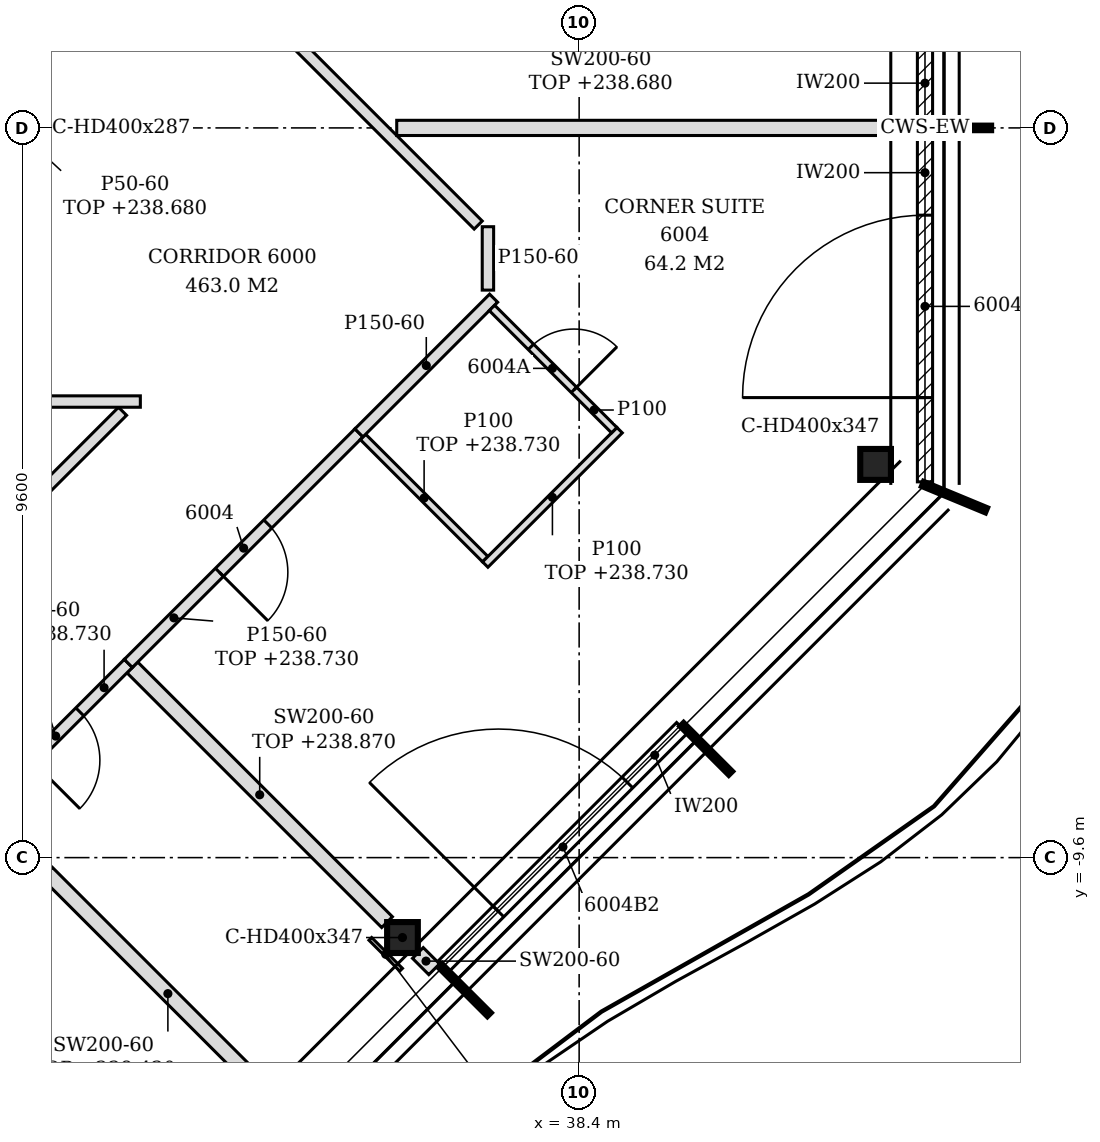
"""IFC4 building model, lengths in metres.
Left out: names, types, materials, properties, quantities, classifications, styles, units other than length and angle.
Written with IfcOpenShell. Run it as: python <this file> out.ifc"""

import sys

from ifc_helpers import new_model, si_unit, direction, frame, frame_2d, origin, origin_2d, place, context, subcontext, project, spatial, polyline, rectangle, i_section, outline, extrude, element, fill, save


model = new_model("IFC4")
c1 = context("Model", 3, precision=1e-05, world=origin(), true_north=direction((0.0, 1.0)))
c2 = subcontext(c1, "Body", "Model", "MODEL_VIEW")
j1 = project(units=[si_unit("LENGTHUNIT", "METRE"), si_unit("PLANEANGLEUNIT", "RADIAN")], contexts=[c1])
p1 = place(None, origin())
s1 = spatial("IfcSite", under=j1, at=p1, CompositionType="ELEMENT")
p2 = place(p1, origin())
s2 = spatial("IfcBuilding", under=s1, at=p2, CompositionType="ELEMENT")
p3 = place(p2, frame((0.0, 0.0, 235.8)))
s3 = spatial("IfcBuildingStorey", under=s2, at=p3, CompositionType="ELEMENT", Elevation=235.8)
for number, where, z_axis, x_axis in (
    (1, (36.076, -10.652, -0.15), (0.0, 0.0, 1.0), (1.0, 0.0, 0.0)),
    (2, (42.3, -4.427, -0.15), (0.0, 0.0, 1.0), (1.0, 0.0, 0.0)),
):
    element("IfcColumn", number, at=place(p3, frame(where, z_axis=z_axis, x_axis=x_axis)), inside=s3, PredefinedType="COLUMN", context=c2, shape_type="SweptSolid", body=[
        extrude(i_section(OverallWidth=0.404, OverallDepth=0.407, WebThickness=0.027, FlangeThickness=0.044, FilletRadius=0.015, at=origin_2d()), origin(), (0.0, 0.0, 1.0), 3.6),
    ])
p4 = place(p3, frame((36.62, -11.026, 0.0), z_axis=(0.0, 0.0, 1.0), x_axis=(0.707106781187, 0.707106781187, 0.0)))
e3 = element("IfcWall", 3, at=p4, inside=s3, PredefinedType="NOTDEFINED", context=c2, shape_type="SweptSolid", body=[
    extrude(rectangle(XDim=4.431, YDim=0.2, at=frame_2d((2.215, 0.0))), origin(), (0.0, 0.0, 1.0), 3.45),
])
p5 = place(p4, frame((1.015, 0.0, 0.0)))
e4 = element("IfcOpeningElement", 4, at=p5, cuts=e3, PredefinedType="OPENING", context=c2, shape_type="SweptSolid", body=[
    extrude(rectangle(XDim=2.4, YDim=2.4, at=frame_2d((1.2, 1.2))), frame((0.0, 0.11, 0.0), z_axis=(0.0, -1.0, 0.0), x_axis=(1.0, 0.0, 0.0)), (0.0, 0.0, 1.0), 0.22),
])
p6 = place(p3, frame((42.95, -4.656, 0.0), z_axis=(0.0, 0.0, 1.0), x_axis=(0.0, 1.0, 0.0)))
e5 = element("IfcWall", 5, at=p6, inside=s3, PredefinedType="NOTDEFINED", context=c2, shape_type="SweptSolid", body=[
    extrude(rectangle(XDim=4.626, YDim=0.2, at=frame_2d((2.313, 0.0))), origin(), (0.0, 0.0, 1.0), 3.45),
])
p7 = place(p6, frame((1.108, 0.0, 0.0)))
e6 = element("IfcOpeningElement", 6, at=p7, cuts=e5, PredefinedType="OPENING", context=c2, shape_type="SweptSolid", body=[
    extrude(rectangle(XDim=2.4, YDim=2.4, at=frame_2d((1.2, 1.2))), frame((0.0, 0.11, 0.0), z_axis=(0.0, -1.0, 0.0), x_axis=(1.0, 0.0, 0.0)), (0.0, 0.0, 1.0), 0.22),
])
p8 = place(p3, frame((42.95, 0.03, 0.0), z_axis=(0.0, 0.0, 1.0), x_axis=(0.0, 1.0, 0.0)))
e7 = element("IfcWall", 7, at=p8, inside=s3, PredefinedType="NOTDEFINED", context=c2, shape_type="SweptSolid", body=[
    extrude(rectangle(XDim=4.626, YDim=0.2, at=frame_2d((2.313, 0.0))), origin(), (0.0, 0.0, 1.0), 3.45),
])
p9 = place(p8, frame((1.118, 0.0, 0.0)))
e8 = element("IfcOpeningElement", 8, at=p9, cuts=e7, PredefinedType="OPENING", context=c2, shape_type="SweptSolid", body=[
    extrude(rectangle(XDim=2.4, YDim=2.4, at=frame_2d((1.2, 1.2))), frame((0.0, 0.11, 0.0), z_axis=(0.0, -1.0, 0.0), x_axis=(1.0, 0.0, 0.0)), (0.0, 0.0, 1.0), 0.22),
])
p10 = place(p3, frame((34.581, -12.981, 0.0), z_axis=(0.0, 0.0, 1.0), x_axis=(-0.707133900936, 0.707079660397, 0.0)))
e9 = element("IfcWall", 9, at=p10, inside=s3, PredefinedType="PARTITIONING", context=c2, shape_type="SweptSolid", body=[
    extrude(rectangle(XDim=4.501, YDim=0.2, at=frame_2d((2.25, 0.0))), origin(), (0.0, 0.0, 1.0), 2.63),
])
p11 = place(p3, frame((24.468, -11.653, 0.0), z_axis=(0.0, 0.0, 1.0), x_axis=(0.707095889299, 0.707117672906, 0.0)))
e10 = element("IfcWall", 10, at=p11, inside=s3, PredefinedType="PARTITIONING", context=c2, shape_type="SweptSolid", body=[
    extrude(rectangle(XDim=11.208, YDim=0.15, at=frame_2d((5.604, 0.0))), origin(), (0.0, 0.0, 1.0), 2.88),
])
p12 = place(p3, frame((36.493, -11.069, 0.0), z_axis=(0.0, 0.0, 1.0), x_axis=(-0.707106781187, 0.707106781187, 0.0)))
e11 = element("IfcWall", 11, at=p12, inside=s3, PredefinedType="PARTITIONING", context=c2, shape_type="SweptSolid", body=[
    extrude(rectangle(XDim=0.303, YDim=0.2, at=frame_2d((0.152, 0.0))), origin(), (0.0, 0.0, 1.0), 3.45),
])
p13 = place(p3, frame((35.873, -10.449, 0.0), z_axis=(0.0, 0.0, 1.0), x_axis=(-0.707081021846, 0.707132539589, 0.0)))
e12 = element("IfcWall", 12, at=p13, inside=s3, PredefinedType="PARTITIONING", context=c2, shape_type="SweptSolid", body=[
    extrude(rectangle(XDim=4.739, YDim=0.2, at=frame_2d((2.37, 0.0))), origin(), (0.0, 0.0, 1.0), 3.07),
])
p14 = place(p3, frame((30.628, -8.886, 0.0), z_axis=(0.0, 0.0, 1.0), x_axis=(0.707106781187, 0.707106781187, 0.0)))
e13 = element("IfcWall", 13, at=p14, inside=s3, PredefinedType="PARTITIONING", context=c2, shape_type="SweptSolid", body=[
    extrude(rectangle(XDim=2.604, YDim=0.15, at=frame_2d((1.302, 0.0))), origin(), (0.0, 0.0, 1.0), 2.93),
])
p15 = place(p14, frame((0.802, 0.0, 0.0)))
e14 = element("IfcOpeningElement", 14, at=p15, cuts=e13, PredefinedType="OPENING", context=c2, shape_type="SweptSolid", body=[
    extrude(rectangle(XDim=0.9, YDim=2.1, at=frame_2d((0.45, 1.05))), frame((0.0, 0.085, 0.0), z_axis=(0.0, -1.0, 0.0), x_axis=(1.0, 0.0, 0.0)), (0.0, 0.0, 1.0), 0.17),
])
p16 = place(p3, frame((32.469, -7.045, 0.0), z_axis=(0.0, 0.0, 1.0), x_axis=(0.70722059203, 0.706992952022, 0.0)))
e15 = element("IfcWall", 15, at=p16, inside=s3, PredefinedType="PARTITIONING", context=c2, shape_type="SweptSolid", body=[
    extrude(rectangle(XDim=4.29, YDim=0.15, at=frame_2d((2.145, 0.0))), origin(), (0.0, 0.0, 1.0), 2.93),
])
p17 = place(p16, frame((1.695, 0.0, 0.0)))
e16 = element("IfcOpeningElement", 16, at=p17, cuts=e15, PredefinedType="OPENING", context=c2, shape_type="SweptSolid", body=[
    extrude(rectangle(XDim=0.9, YDim=2.1, at=frame_2d((0.45, 1.05))), frame((0.0, 0.085, 0.0), z_axis=(0.0, -1.0, 0.0), x_axis=(1.0, 0.0, 0.0)), (0.0, 0.0, 1.0), 0.17),
])
p18 = place(p3, frame((37.165, -5.674, 0.0), z_axis=(0.0, 0.0, 1.0), x_axis=(-0.707106781187, 0.707106781187, 0.0)))
e17 = element("IfcWall", 17, at=p18, inside=s3, PredefinedType="PARTITIONING", context=c2, shape_type="SweptSolid", body=[
    extrude(rectangle(XDim=2.275, YDim=0.1, at=frame_2d((1.137, 0.0))), origin(), (0.0, 0.0, 1.0), 2.93),
])
p19 = place(p3, frame((37.165, -5.744, 0.0), z_axis=(0.0, 0.0, 1.0), x_axis=(0.707155609469, 0.707057949532, 0.0)))
e18 = element("IfcWall", 18, at=p19, inside=s3, PredefinedType="PARTITIONING", context=c2, shape_type="SweptSolid", body=[
    extrude(rectangle(XDim=2.5, YDim=0.1, at=frame_2d((1.25, 0.0))), origin(), (0.0, 0.0, 1.0), 2.93),
])
p20 = place(p3, frame((35.503, -4.012, 0.0), z_axis=(0.0, 0.0, 1.0), x_axis=(0.707106781187, 0.707106781187, 0.0)))
e19 = element("IfcWall", 19, at=p20, inside=s3, PredefinedType="PARTITIONING", context=c2, shape_type="SweptSolid", body=[
    extrude(rectangle(XDim=2.506, YDim=0.15, at=frame_2d((1.253, 0.0))), origin(), (0.0, 0.0, 1.0), 3.45),
])
p21 = place(p3, frame((38.862, -3.977, 0.0), z_axis=(0.0, 0.0, 1.0), x_axis=(-0.707106781187, 0.707106781187, 0.0)))
e20 = element("IfcWall", 20, at=p21, inside=s3, PredefinedType="PARTITIONING", context=c2, shape_type="SweptSolid", body=[
    extrude(rectangle(XDim=2.275, YDim=0.1, at=frame_2d((1.137, 0.0))), origin(), (0.0, 0.0, 1.0), 3.45),
])
p22 = place(p21, frame((0.75, 0.0, 0.0)))
e21 = element("IfcOpeningElement", 21, at=p22, cuts=e20, PredefinedType="OPENING", context=c2, shape_type="SweptSolid", body=[
    extrude(rectangle(XDim=0.8, YDim=2.1, at=frame_2d((0.4, 1.05))), frame((0.0, 0.06, 0.0), z_axis=(0.0, -1.0, 0.0), x_axis=(1.0, 0.0, 0.0)), (0.0, 0.0, 1.0), 0.12),
])
p23 = place(p3, frame((19.125, -3.6, 0.0), z_axis=(0.0, 0.0, 1.0), x_axis=(1.0, 0.0, 0.0)))
e22 = element("IfcWall", 22, at=p23, inside=s3, PredefinedType="PARTITIONING", context=c2, shape_type="SweptSolid", body=[
    extrude(outline(polyline([(0.0, 0.0), (13.502, 0.0), (13.502, 3.45), (12.225, 3.45), (12.223, 2.93), (11.925, 2.93), (11.923, 3.45), (0.225, 3.45), (0.223, 2.83), (0.0, 2.83), (0.0, 0.0)])), frame((0.0, 0.075, 0.0), z_axis=(0.0, -1.0, 0.0), x_axis=(1.0, 0.0, 0.0)), (0.0, 0.0, 1.0), 0.15),
])
p24 = place(p23, frame((6.286, 0.0, 0.0)))
e23 = element("IfcOpeningElement", 23, at=p24, cuts=e22, PredefinedType="OPENING", context=c2, shape_type="SweptSolid", body=[
    extrude(rectangle(XDim=0.9, YDim=2.1, at=frame_2d((0.45, 1.05))), frame((0.0, 0.085, 0.0), z_axis=(0.0, -1.0, 0.0), x_axis=(1.0, 0.0, 0.0)), (0.0, 0.0, 1.0), 0.17),
])
p25 = place(p3, frame((37.2, -2.134, 0.0), z_axis=(0.0, 0.0, 1.0), x_axis=(0.0, 1.0, 0.0)))
e24 = element("IfcWall", 24, at=p25, inside=s3, PredefinedType="PARTITIONING", context=c2, shape_type="SweptSolid", body=[
    extrude(rectangle(XDim=0.834, YDim=0.15, at=frame_2d((0.417, 0.0))), origin(), (0.0, 0.0, 1.0), 3.45),
])
p26 = place(p3, frame((37.072, -1.278, 0.0), z_axis=(0.0, 0.0, 1.0), x_axis=(-0.707106781187, 0.707106781187, 0.0)))
e25 = element("IfcWall", 25, at=p26, inside=s3, PredefinedType="PARTITIONING", context=c2, shape_type="SweptSolid", body=[
    extrude(rectangle(XDim=20.294, YDim=0.15, at=frame_2d((10.147, 0.0))), origin(), (0.0, 0.0, 1.0), 2.88),
])
p27 = place(p26, frame((3.824, 0.0, 0.0)))
e26 = element("IfcOpeningElement", 26, at=p27, cuts=e25, PredefinedType="OPENING", context=c2, shape_type="SweptSolid", body=[
    extrude(rectangle(XDim=0.9, YDim=2.1, at=frame_2d((0.45, 1.05))), frame((0.0, 0.085, 0.0), z_axis=(0.0, -1.0, 0.0), x_axis=(1.0, 0.0, 0.0)), (0.0, 0.0, 1.0), 0.17),
])
p28 = place(p26, frame((10.042, 0.0, 0.0)))
e27 = element("IfcOpeningElement", 27, at=p28, cuts=e25, PredefinedType="OPENING", context=c2, shape_type="SweptSolid", body=[
    extrude(rectangle(XDim=0.9, YDim=2.1, at=frame_2d((0.45, 1.05))), frame((0.0, 0.085, 0.0), z_axis=(0.0, -1.0, 0.0), x_axis=(1.0, 0.0, 0.0)), (0.0, 0.0, 1.0), 0.17),
])
p29 = place(p26, frame((14.443, 0.0, 0.0)))
e28 = element("IfcOpeningElement", 28, at=p29, cuts=e25, PredefinedType="OPENING", context=c2, shape_type="SweptSolid", body=[
    extrude(rectangle(XDim=0.9, YDim=2.1, at=frame_2d((0.45, 1.05))), frame((0.0, 0.085, 0.0), z_axis=(0.0, -1.0, 0.0), x_axis=(1.0, 0.0, 0.0)), (0.0, 0.0, 1.0), 0.17),
])
p30 = place(p3, frame((36.0, 0.0, 0.0), z_axis=(0.0, 0.0, 1.0), x_axis=(1.0, 0.0, 0.0)))
e29 = element("IfcWall", 29, at=p30, inside=s3, PredefinedType="PARTITIONING", context=c2, shape_type="SweptSolid", body=[
    extrude(rectangle(XDim=6.85, YDim=0.2, at=frame_2d((3.425, 0.0))), origin(), (0.0, 0.0, 1.0), 2.88),
])
p31 = place(p3, frame((36.058, -11.075, 0.0), z_axis=(0.0, 0.0, 1.0), x_axis=(-0.707106781187, 0.707106781187, 0.0)))
e30 = element("IfcWall", 30, at=p31, inside=s3, PredefinedType="PARTITIONING", context=c2, shape_type="SweptSolid", body=[
    extrude(rectangle(XDim=0.573, YDim=0.05, at=frame_2d((0.287, 0.0))), origin(), (0.0, 0.0, 1.0), 2.63),
])
p32 = place(p5, origin())
e31 = element("IfcDoor", 31, at=p32, inside=s3, OperationType="SINGLE_SWING_LEFT", PredefinedType="DOOR", context=c2, shape_type="SweptSolid", body=[
    extrude(rectangle(XDim=2.4, YDim=2.4, at=frame_2d((1.2, 1.2))), frame((0.0, 0.025, 0.0), z_axis=(0.0, -1.0, 0.0), x_axis=(1.0, 0.0, 0.0)), (0.0, 0.0, 1.0), 0.05),
])
fill(e4, e31)
p33 = place(p7, origin())
e32 = element("IfcDoor", 32, at=p33, inside=s3, OperationType="SINGLE_SWING_LEFT", PredefinedType="DOOR", context=c2, shape_type="SweptSolid", body=[
    extrude(rectangle(XDim=2.4, YDim=2.4, at=frame_2d((1.2, 1.2))), frame((0.0, 0.025, 0.0), z_axis=(0.0, -1.0, 0.0), x_axis=(1.0, 0.0, 0.0)), (0.0, 0.0, 1.0), 0.05),
])
fill(e6, e32)
p34 = place(p15, frame((0.9, 0.0, 0.0), z_axis=(0.0, 0.0, 1.0), x_axis=(-1.0, 0.0, 0.0)))
e33 = element("IfcDoor", 33, at=p34, inside=s3, OperationType="SINGLE_SWING_RIGHT", PredefinedType="DOOR", context=c2, shape_type="SweptSolid", body=[
    extrude(rectangle(XDim=0.9, YDim=2.1, at=frame_2d((0.45, 1.05))), frame((0.0, 0.025, 0.0), z_axis=(0.0, -1.0, 0.0), x_axis=(1.0, 0.0, 0.0)), (0.0, 0.0, 1.0), 0.05),
])
fill(e14, e33)
p35 = place(p17, frame((0.9, 0.0, 0.0), z_axis=(0.0, 0.0, 1.0), x_axis=(-1.0, 0.0, 0.0)))
e34 = element("IfcDoor", 34, at=p35, inside=s3, OperationType="SINGLE_SWING_RIGHT", PredefinedType="DOOR", context=c2, shape_type="SweptSolid", body=[
    extrude(rectangle(XDim=0.9, YDim=2.1, at=frame_2d((0.45, 1.05))), frame((0.0, 0.025, 0.0), z_axis=(0.0, -1.0, 0.0), x_axis=(1.0, 0.0, 0.0)), (0.0, 0.0, 1.0), 0.05),
])
fill(e16, e34)
p36 = place(p22, frame((0.8, 0.0, 0.0), z_axis=(0.0, 0.0, 1.0), x_axis=(-1.0, 0.0, 0.0)))
e35 = element("IfcDoor", 35, at=p36, inside=s3, OperationType="SINGLE_SWING_RIGHT", PredefinedType="DOOR", context=c2, shape_type="SweptSolid", body=[
    extrude(rectangle(XDim=0.8, YDim=2.1, at=frame_2d((0.4, 1.05))), frame((0.0, 0.025, 0.0), z_axis=(0.0, -1.0, 0.0), x_axis=(1.0, 0.0, 0.0)), (0.0, 0.0, 1.0), 0.05),
])
fill(e21, e35)
save(model, sys.argv[1])
